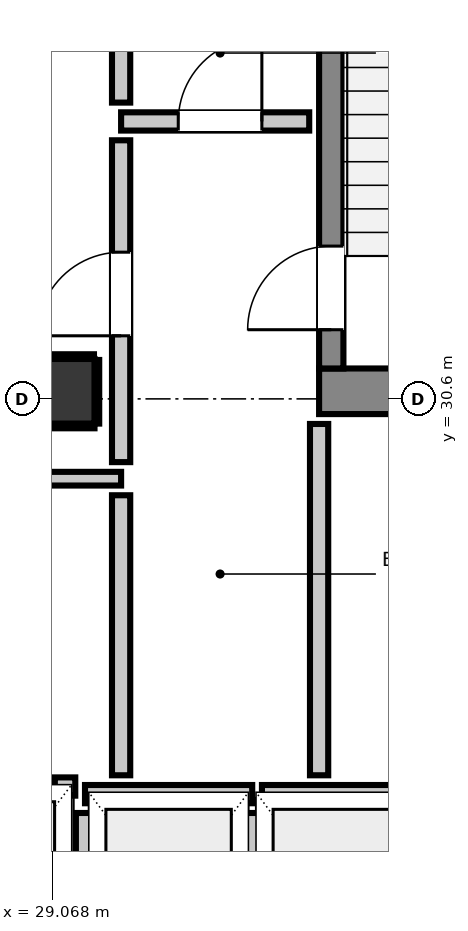
"""IFC4 building model, lengths in metres.
Left out: names, types, materials, properties, quantities, classifications, styles, units other than length and angle.
Written with IfcOpenShell. Run it as: python <this file> out.ifc"""

import sys

from ifc_helpers import new_model, si_unit, direction, frame, frame_2d, origin, origin_2d, place, context, subcontext, project, spatial, rectangle, extrude, element, fill, save


model = new_model("IFC4")
c1 = context("Model", 3, precision=1e-05, world=origin(), true_north=direction((0.0, 1.0)))
c2 = subcontext(c1, "Body", "Model", "MODEL_VIEW")
j1 = project(units=[si_unit("LENGTHUNIT", "METRE"), si_unit("PLANEANGLEUNIT", "RADIAN")], contexts=[c1])
p1 = place(None, origin())
s1 = spatial("IfcSite", under=j1, at=p1, CompositionType="ELEMENT")
p2 = place(p1, origin())
s2 = spatial("IfcBuilding", under=s1, at=p2, CompositionType="ELEMENT")
p3 = place(p2, frame((0.0, 0.0, 206.76)))
s3 = spatial("IfcBuildingStorey", under=s2, at=p3, CompositionType="ELEMENT", Elevation=206.76)
p4 = place(p3, frame((32.58, 30.7, 0.0), z_axis=(0.0, 0.0, 1.0), x_axis=(1.0, 0.0, 0.0)))
e1 = element("IfcWall", 1, at=p4, inside=s3, PredefinedType="SHEAR", context=c2, shape_type="SweptSolid", body=[
    extrude(rectangle(XDim=3.54, YDim=0.6, at=frame_2d((1.77, 0.0))), origin(), (0.0, 0.0, 1.0), 3.32),
])
p5 = place(p3, frame((32.74, 31.0, 0.0), z_axis=(0.0, 0.0, 1.0), x_axis=(0.0, 1.0, 0.0)))
e2 = element("IfcWall", 2, at=p5, inside=s3, PredefinedType="SHEAR", context=c2, shape_type="SweptSolid", body=[
    extrude(rectangle(XDim=7.8, YDim=0.32, at=frame_2d((3.9, 0.0))), origin(), (0.0, 0.0, 1.0), 3.32),
])
p6 = place(p5, frame((0.51, 0.0, 0.0)))
e3 = element("IfcOpeningElement", 3, at=p6, cuts=e2, PredefinedType="OPENING", context=c2, shape_type="SweptSolid", body=[
    extrude(rectangle(XDim=1.1, YDim=2.15, at=frame_2d((0.55, 1.075))), frame((0.0, 0.17, 0.0), z_axis=(0.0, -1.0, 0.0), x_axis=(1.0, 0.0, 0.0)), (0.0, 0.0, 1.0), 0.34),
])
p7 = place(p3, frame((29.2, 30.7, 0.0), z_axis=(0.0, 0.0, 1.0), x_axis=(1.0, 0.0, 0.0)))
e4 = element("IfcColumn", 4, at=p7, inside=s3, PredefinedType="COLUMN", context=c2, shape_type="SweptSolid", body=[
    extrude(rectangle(XDim=0.85, YDim=0.85, at=origin_2d()), origin(), (0.0, 0.0, 1.0), 3.32),
])
p8 = place(p3, frame((29.5, 25.4, 0.0), z_axis=(0.0, 0.0, 1.0), x_axis=(1.0, 0.0, 0.0)))
e5 = element("IfcWall", 5, at=p8, inside=s3, PredefinedType="PARTITIONING", context=c2, shape_type="SweptSolid", body=[
    extrude(rectangle(XDim=2.2, YDim=0.24, at=frame_2d((1.1, 0.0))), origin(), (0.0, 0.0, 1.0), 2.9),
])
p9 = place(p3, frame((29.5, 22.848, 0.0), z_axis=(0.0, 0.0, 1.0), x_axis=(0.0, 1.0, 0.0)))
e6 = element("IfcWall", 6, at=p9, inside=s3, PredefinedType="PARTITIONING", context=c2, shape_type="SweptSolid", body=[
    extrude(rectangle(XDim=2.304, YDim=0.24, at=frame_2d((1.152, 0.0))), origin(), (0.0, 0.0, 1.0), 0.905),
])
p10 = place(p3, frame((31.7, 22.848, 0.0), z_axis=(0.0, 0.0, 1.0), x_axis=(0.0, 1.0, 0.0)))
e7 = element("IfcWall", 7, at=p10, inside=s3, PredefinedType="PARTITIONING", context=c2, shape_type="SweptSolid", body=[
    extrude(rectangle(XDim=2.304, YDim=0.24, at=frame_2d((1.152, 0.0))), origin(), (0.0, 0.0, 1.0), 2.9),
])
p11 = place(p3, frame((31.828, 25.4, 0.0), z_axis=(0.0, 0.0, 1.0), x_axis=(1.0, 0.0, 0.0)))
e8 = element("IfcWall", 8, at=p11, inside=s3, PredefinedType="PARTITIONING", context=c2, shape_type="SweptSolid", body=[
    extrude(rectangle(XDim=2.072, YDim=0.24, at=frame_2d((1.036, 0.0))), origin(), (0.0, 0.0, 1.0), 2.9),
])
p12 = place(p3, frame((29.103, 25.5, 0.0), z_axis=(0.0, 0.0, 1.0), x_axis=(1.0, 0.0, 0.0)))
e9 = element("IfcWall", 9, at=p12, inside=s3, PredefinedType="PARTITIONING", context=c2, shape_type="SweptSolid", body=[
    extrude(rectangle(XDim=0.269, YDim=0.24, at=frame_2d((0.135, 0.0))), origin(), (0.0, 0.0, 1.0), 2.9),
])
p13 = place(p3, frame((29.975, 34.25, 0.0), z_axis=(0.0, 0.0, 1.0), x_axis=(1.0, 0.0, 0.0)))
e10 = element("IfcWall", 10, at=p13, inside=s3, PredefinedType="PARTITIONING", context=c2, shape_type="SweptSolid", body=[
    extrude(rectangle(XDim=2.475, YDim=0.24, at=frame_2d((1.237, 0.0))), origin(), (0.0, 0.0, 1.0), 2.9),
])
p14 = place(p13, frame((0.752, 0.0, 0.0)))
e11 = element("IfcOpeningElement", 11, at=p14, cuts=e10, PredefinedType="OPENING", context=c2, shape_type="SweptSolid", body=[
    extrude(rectangle(XDim=1.1, YDim=2.15, at=frame_2d((0.55, 1.075))), frame((0.0, 0.13, 0.0), z_axis=(0.0, -1.0, 0.0), x_axis=(1.0, 0.0, 0.0)), (0.0, 0.0, 1.0), 0.26),
])
p15 = place(p3, frame((28.593, 29.55, 0.0), z_axis=(0.0, 0.0, 1.0), x_axis=(1.0, 0.0, 0.0)))
e12 = element("IfcWall", 12, at=p15, inside=s3, PredefinedType="PARTITIONING", context=c2, shape_type="SweptSolid", body=[
    extrude(rectangle(XDim=1.382, YDim=0.18, at=frame_2d((0.691, 0.0))), origin(), (0.0, 0.0, 1.0), 2.9),
])
p16 = place(p3, frame((29.975, 25.648, 0.0), z_axis=(0.0, 0.0, 1.0), x_axis=(0.0, 1.0, 0.0)))
e13 = element("IfcWall", 13, at=p16, inside=s3, PredefinedType="PARTITIONING", context=c2, shape_type="SweptSolid", body=[
    extrude(rectangle(XDim=3.684, YDim=0.24, at=frame_2d((1.842, 0.0))), origin(), (0.0, 0.0, 1.0), 2.9),
])
p17 = place(p3, frame((29.975, 29.768, 0.0), z_axis=(0.0, 0.0, 1.0), x_axis=(0.0, 1.0, 0.0)))
e14 = element("IfcWall", 14, at=p17, inside=s3, PredefinedType="PARTITIONING", context=c2, shape_type="SweptSolid", body=[
    extrude(rectangle(XDim=4.234, YDim=0.24, at=frame_2d((2.117, 0.0))), origin(), (0.0, 0.0, 1.0), 2.9),
])
p18 = place(p17, frame((1.662, 0.0, 0.0)))
e15 = element("IfcOpeningElement", 15, at=p18, cuts=e14, PredefinedType="OPENING", context=c2, shape_type="SweptSolid", body=[
    extrude(rectangle(XDim=1.1, YDim=2.15, at=frame_2d((0.55, 1.075))), frame((0.0, 0.13, 0.0), z_axis=(0.0, -1.0, 0.0), x_axis=(1.0, 0.0, 0.0)), (0.0, 0.0, 1.0), 0.26),
])
p19 = place(p3, frame((29.975, 34.498, 0.0), z_axis=(0.0, 0.0, 1.0), x_axis=(0.0, 1.0, 0.0)))
e16 = element("IfcWall", 16, at=p19, inside=s3, PredefinedType="PARTITIONING", context=c2, shape_type="SweptSolid", body=[
    extrude(rectangle(XDim=0.924, YDim=0.24, at=frame_2d((0.462, 0.0))), origin(), (0.0, 0.0, 1.0), 2.9),
])
p20 = place(p3, frame((32.58, 25.648, 0.0), z_axis=(0.0, 0.0, 1.0), x_axis=(0.0, 1.0, 0.0)))
e17 = element("IfcWall", 17, at=p20, inside=s3, PredefinedType="PARTITIONING", context=c2, shape_type="SweptSolid", body=[
    extrude(rectangle(XDim=4.622, YDim=0.24, at=frame_2d((2.311, 0.0))), origin(), (0.0, 0.0, 1.0), 2.9),
])
p21 = place(p3, frame((28.775, 30.243, 0.0), z_axis=(0.0, 0.0, 1.0), x_axis=(1.0, 0.0, 0.0)))
e18 = element("IfcWall", 18, at=p21, inside=s3, PredefinedType="PARTITIONING", context=c2, shape_type="SweptSolid", body=[
    extrude(rectangle(XDim=0.85, YDim=0.06, at=frame_2d((0.425, 0.0))), origin(), (0.0, 0.0, 1.0), 0.905),
])
p22 = place(p3, frame((28.775, 31.157, 0.0), z_axis=(0.0, 0.0, 1.0), x_axis=(1.0, 0.0, 0.0)))
e19 = element("IfcWall", 19, at=p22, inside=s3, PredefinedType="PARTITIONING", context=c2, shape_type="SweptSolid", body=[
    extrude(rectangle(XDim=0.843, YDim=0.06, at=frame_2d((0.421, 0.0))), origin(), (0.0, 0.0, 1.0), 0.905),
])
p23 = place(p3, frame((29.657, 30.275, 0.0), z_axis=(0.0, 0.0, 1.0), x_axis=(0.0, 1.0, 0.0)))
e20 = element("IfcWall", 20, at=p23, inside=s3, PredefinedType="PARTITIONING", context=c2, shape_type="SweptSolid", body=[
    extrude(rectangle(XDim=0.837, YDim=0.06, at=frame_2d((0.418, 0.0))), origin(), (0.0, 0.0, 1.0), 0.905),
])
p24 = place(p6, origin())
e21 = element("IfcDoor", 21, at=p24, inside=s3, OperationType="SINGLE_SWING_LEFT", PredefinedType="DOOR", context=c2, shape_type="SweptSolid", body=[
    extrude(rectangle(XDim=1.1, YDim=2.15, at=frame_2d((0.55, 1.075))), frame((0.0, 0.025, 0.0), z_axis=(0.0, -1.0, 0.0), x_axis=(1.0, 0.0, 0.0)), (0.0, 0.0, 1.0), 0.05),
])
fill(e3, e21)
p25 = place(p18, origin())
e22 = element("IfcDoor", 22, at=p25, inside=s3, OperationType="SINGLE_SWING_LEFT", PredefinedType="DOOR", context=c2, shape_type="SweptSolid", body=[
    extrude(rectangle(XDim=1.1, YDim=2.15, at=frame_2d((0.55, 1.075))), frame((0.0, 0.025, 0.0), z_axis=(0.0, -1.0, 0.0), x_axis=(1.0, 0.0, 0.0)), (0.0, 0.0, 1.0), 0.05),
])
fill(e15, e22)
p26 = place(p14, origin())
e23 = element("IfcDoor", 23, at=p26, inside=s3, OperationType="SINGLE_SWING_RIGHT", PredefinedType="DOOR", context=c2, shape_type="SweptSolid", body=[
    extrude(rectangle(XDim=1.1, YDim=2.15, at=frame_2d((0.55, 1.075))), frame((0.0, 0.025, 0.0), z_axis=(0.0, -1.0, 0.0), x_axis=(1.0, 0.0, 0.0)), (0.0, 0.0, 1.0), 0.05),
])
fill(e11, e23)
save(model, sys.argv[1])
